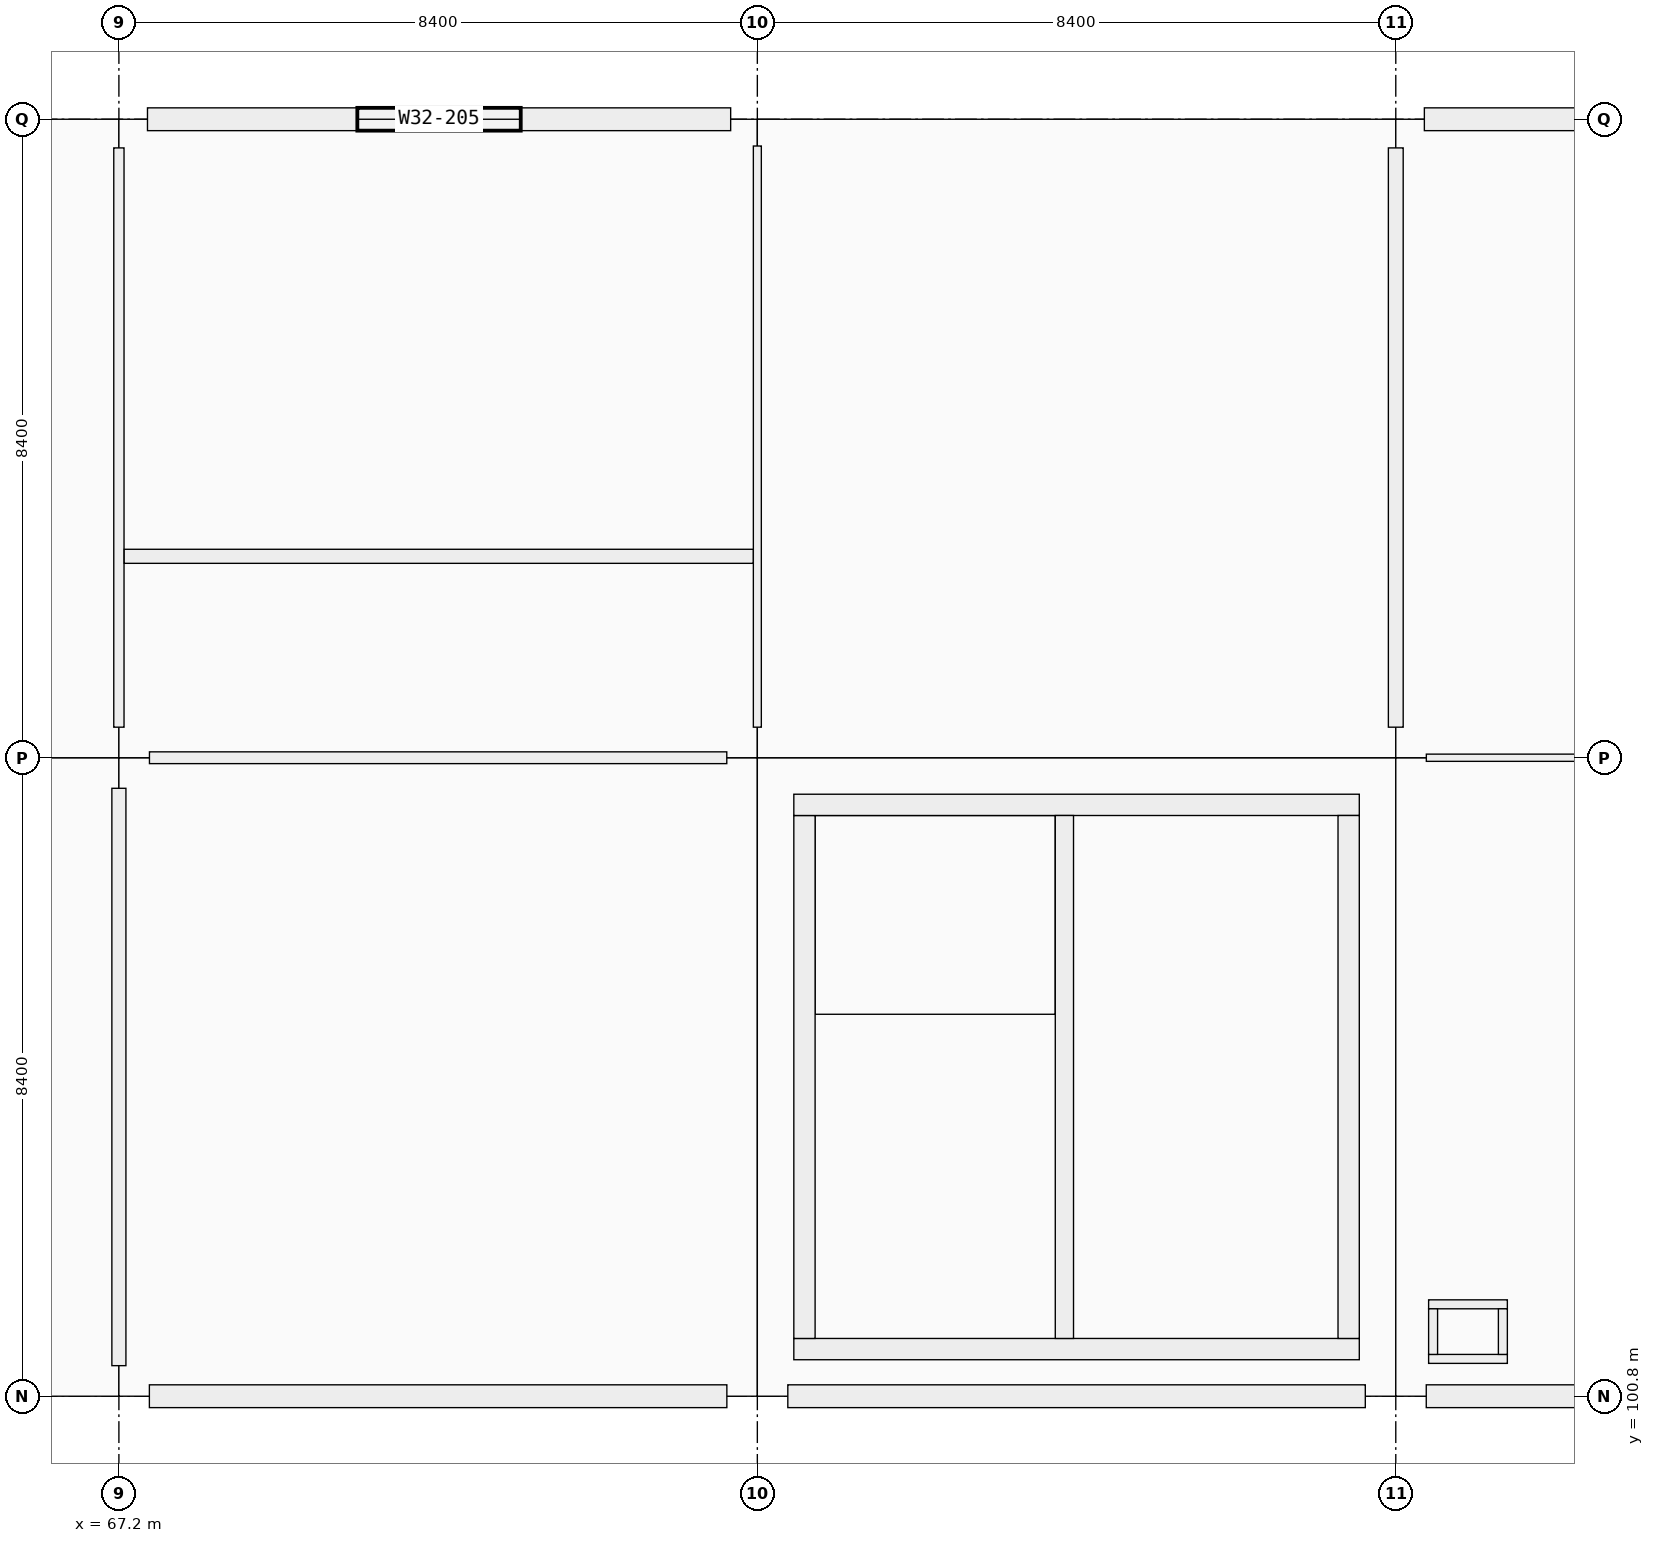
"""IFC4 building model, lengths in metres.
Left out: names, types, materials, properties, quantities, classifications, styles, units other than length and angle.
Written with IfcOpenShell. Run it as: python <this file> out.ifc"""

import sys

from ifc_helpers import new_model, si_unit, direction, frame, frame_2d, origin, origin_2d, place, context, subcontext, project, spatial, rectangle, extrude, element, fill, save


model = new_model("IFC4")
c1 = context("Model", 3, precision=1e-05, world=origin(), true_north=direction((0.0, 1.0)))
c2 = subcontext(c1, "Body", "Model", "MODEL_VIEW")
j1 = project(units=[si_unit("LENGTHUNIT", "METRE"), si_unit("PLANEANGLEUNIT", "RADIAN")], contexts=[c1])
p1 = place(None, origin())
s1 = spatial("IfcSite", under=j1, at=p1, CompositionType="ELEMENT")
p2 = place(p1, origin())
s2 = spatial("IfcBuilding", under=s1, at=p2, CompositionType="ELEMENT")
p3 = place(p2, frame((0.0, 0.0, 14.76)))
s3 = spatial("IfcBuildingStorey", under=s2, at=p3, CompositionType="ELEMENT", Elevation=14.76)
for number, where, z_axis, x_axis in (
    (1, (67.2, 100.8, 0.0), (0.0, 0.0, 1.0), (1.0, 0.0, 0.0)),
    (2, (67.2, 109.2, 0.0), (0.0, 0.0, 1.0), (1.0, 0.0, 0.0)),
):
    element("IfcColumn", number, at=place(p3, frame(where, z_axis=z_axis, x_axis=x_axis)), inside=s3, PredefinedType="COLUMN", context=c2, shape_type="SweptSolid", body=[
        extrude(rectangle(XDim=0.8, YDim=0.8, at=origin_2d()), origin(), (0.0, 0.0, 1.0), 4.32),
    ])
p4 = place(p3, frame((67.2, 117.6, 0.0), z_axis=(0.0, 0.0, 1.0), x_axis=(1.0, 0.0, 0.0)))
e3 = element("IfcColumn", 3, at=p4, inside=s3, PredefinedType="COLUMN", context=c2, shape_type="SweptSolid", body=[
    extrude(rectangle(XDim=0.75, YDim=0.75, at=origin_2d()), origin(), (0.0, 0.0, 1.0), 4.32),
])
for number, where, z_axis, x_axis in (
    (4, (75.6, 100.8, 0.0), (0.0, 0.0, 1.0), (1.0, 0.0, 0.0)),
    (5, (75.6, 109.2, 0.0), (0.0, 0.0, 1.0), (1.0, 0.0, 0.0)),
):
    element("IfcColumn", number, at=place(p3, frame(where, z_axis=z_axis, x_axis=x_axis)), inside=s3, PredefinedType="COLUMN", context=c2, shape_type="SweptSolid", body=[
        extrude(rectangle(XDim=0.8, YDim=0.8, at=origin_2d()), origin(), (0.0, 0.0, 1.0), 4.32),
    ])
p5 = place(p3, frame((75.6, 117.6, 0.0), z_axis=(0.0, 0.0, 1.0), x_axis=(1.0, 0.0, 0.0)))
e6 = element("IfcColumn", 6, at=p5, inside=s3, PredefinedType="COLUMN", context=c2, shape_type="SweptSolid", body=[
    extrude(rectangle(XDim=0.7, YDim=0.7, at=origin_2d()), origin(), (0.0, 0.0, 1.0), 4.32),
])
for number, where, z_axis, x_axis in (
    (7, (84.0, 100.8, 0.0), (0.0, 0.0, 1.0), (1.0, 0.0, 0.0)),
    (8, (84.0, 109.2, 0.0), (0.0, 0.0, 1.0), (1.0, 0.0, 0.0)),
):
    element("IfcColumn", number, at=place(p3, frame(where, z_axis=z_axis, x_axis=x_axis)), inside=s3, PredefinedType="COLUMN", context=c2, shape_type="SweptSolid", body=[
        extrude(rectangle(XDim=0.8, YDim=0.8, at=origin_2d()), origin(), (0.0, 0.0, 1.0), 4.32),
    ])
p6 = place(p3, frame((84.0, 117.6, 0.0), z_axis=(0.0, 0.0, 1.0), x_axis=(1.0, 0.0, 0.0)))
e9 = element("IfcColumn", 9, at=p6, inside=s3, PredefinedType="COLUMN", context=c2, shape_type="SweptSolid", body=[
    extrude(rectangle(XDim=0.75, YDim=0.75, at=origin_2d()), origin(), (0.0, 0.0, 1.0), 4.32),
])
p7 = place(p3, frame((75.199, 100.8, 0.0), z_axis=(0.0, 0.0, 1.0), x_axis=(-1.0, 0.0, 0.0)))
e10 = element("IfcWall", 10, at=p7, inside=s3, PredefinedType="SOLIDWALL", context=c2, shape_type="SweptSolid", body=[
    extrude(rectangle(XDim=7.598, YDim=0.3, at=frame_2d((3.799, 0.0))), origin(), (0.0, 0.0, 1.0), 3.37),
])
p8 = place(p7, frame((2.924, 0.0, 0.9)))
e11 = element("IfcOpeningElement", 11, at=p8, cuts=e10, PredefinedType="OPENING", context=c2, shape_type="SweptSolid", body=[
    extrude(rectangle(XDim=1.75, YDim=1.95, at=frame_2d((0.875, 0.975))), frame((0.0, 0.15, 0.0), z_axis=(0.0, -1.0, 0.0), x_axis=(1.0, 0.0, 0.0)), (0.0, 0.0, 1.0), 0.3),
])
p9 = place(p3, frame((67.576, 117.6, 0.0), z_axis=(0.0, 0.0, 1.0), x_axis=(1.0, 0.0, 0.0)))
e12 = element("IfcWall", 12, at=p9, inside=s3, PredefinedType="SOLIDWALL", context=c2, shape_type="SweptSolid", body=[
    extrude(rectangle(XDim=7.673, YDim=0.3, at=frame_2d((3.836, 0.0))), origin(), (0.0, 0.0, 1.0), 3.37),
])
p10 = place(p9, frame((2.761, 0.0, 0.9)))
e13 = element("IfcOpeningElement", 13, at=p10, cuts=e12, PredefinedType="OPENING", context=c2, shape_type="SweptSolid", body=[
    extrude(rectangle(XDim=2.15, YDim=1.95, at=frame_2d((1.075, 0.975))), frame((0.0, 0.15, 0.0), z_axis=(0.0, -1.0, 0.0), x_axis=(1.0, 0.0, 0.0)), (0.0, 0.0, 1.0), 0.3),
])
p11 = place(p3, frame((83.599, 100.8, 0.0), z_axis=(0.0, 0.0, 1.0), x_axis=(-1.0, 0.0, 0.0)))
e14 = element("IfcWall", 14, at=p11, inside=s3, PredefinedType="SOLIDWALL", context=c2, shape_type="SweptSolid", body=[
    extrude(rectangle(XDim=7.598, YDim=0.3, at=frame_2d((3.799, 0.0))), origin(), (0.0, 0.0, 1.0), 3.37),
])
p12 = place(p3, frame((91.999, 100.8, 0.0), z_axis=(0.0, 0.0, 1.0), x_axis=(-1.0, 0.0, 0.0)))
e15 = element("IfcWall", 15, at=p12, inside=s3, PredefinedType="SOLIDWALL", context=c2, shape_type="SweptSolid", body=[
    extrude(rectangle(XDim=7.598, YDim=0.3, at=frame_2d((3.799, 0.0))), origin(), (0.0, 0.0, 1.0), 3.37),
])
p13 = place(p12, frame((2.824, 0.0, 0.9)))
e16 = element("IfcOpeningElement", 16, at=p13, cuts=e15, PredefinedType="OPENING", context=c2, shape_type="SweptSolid", body=[
    extrude(rectangle(XDim=1.95, YDim=1.6, at=frame_2d((0.975, 0.8))), frame((0.0, 0.15, 0.0), z_axis=(0.0, -1.0, 0.0), x_axis=(1.0, 0.0, 0.0)), (0.0, 0.0, 1.0), 0.3),
])
p14 = place(p3, frame((84.376, 117.6, 0.0), z_axis=(0.0, 0.0, 1.0), x_axis=(1.0, 0.0, 0.0)))
e17 = element("IfcWall", 17, at=p14, inside=s3, PredefinedType="SOLIDWALL", context=c2, shape_type="SweptSolid", body=[
    extrude(rectangle(XDim=7.673, YDim=0.3, at=frame_2d((3.836, 0.0))), origin(), (0.0, 0.0, 1.0), 3.37),
])
p15 = place(p14, frame((2.662, 0.0, 0.9)))
e18 = element("IfcOpeningElement", 18, at=p15, cuts=e17, PredefinedType="OPENING", context=c2, shape_type="SweptSolid", body=[
    extrude(rectangle(XDim=2.35, YDim=1.6, at=frame_2d((1.175, 0.8))), frame((0.0, 0.15, 0.0), z_axis=(0.0, -1.0, 0.0), x_axis=(1.0, 0.0, 0.0)), (0.0, 0.0, 1.0), 0.3),
])
p16 = place(p3, frame((83.52, 101.42, 0.0), z_axis=(0.0, 0.0, 1.0), x_axis=(-1.0, 0.0, 0.0)))
e19 = element("IfcWall", 19, at=p16, inside=s3, PredefinedType="SHEAR", context=c2, shape_type="SweptSolid", body=[
    extrude(rectangle(XDim=7.44, YDim=0.28, at=frame_2d((3.72, 0.0))), origin(), (0.0, 0.0, 1.0), 4.32),
])
p17 = place(p3, frame((76.22, 101.56, 0.0), z_axis=(0.0, 0.0, 1.0), x_axis=(0.0, 1.0, 0.0)))
e20 = element("IfcWall", 20, at=p17, inside=s3, PredefinedType="SHEAR", context=c2, shape_type="SweptSolid", body=[
    extrude(rectangle(XDim=6.88, YDim=0.28, at=frame_2d((3.44, 0.0))), origin(), (0.0, 0.0, 1.0), 4.32),
])
p18 = place(p3, frame((76.08, 108.58, 0.0), z_axis=(0.0, 0.0, 1.0), x_axis=(1.0, 0.0, 0.0)))
e21 = element("IfcWall", 21, at=p18, inside=s3, PredefinedType="SHEAR", context=c2, shape_type="SweptSolid", body=[
    extrude(rectangle(XDim=7.44, YDim=0.28, at=frame_2d((3.72, 0.0))), origin(), (0.0, 0.0, 1.0), 4.32),
])
p19 = place(p3, frame((83.38, 108.44, 0.0), z_axis=(0.0, 0.0, 1.0), x_axis=(0.0, -1.0, 0.0)))
e22 = element("IfcWall", 22, at=p19, inside=s3, PredefinedType="SHEAR", context=c2, shape_type="SweptSolid", body=[
    extrude(rectangle(XDim=6.88, YDim=0.28, at=frame_2d((3.44, 0.0))), origin(), (0.0, 0.0, 1.0), 4.32),
])
p20 = place(p19, frame((3.99, 0.0, 0.0)))
e23 = element("IfcOpeningElement", 23, at=p20, cuts=e22, PredefinedType="OPENING", context=c2, shape_type="SweptSolid", body=[
    extrude(rectangle(XDim=1.5, YDim=2.15, at=frame_2d((0.75, 1.075))), frame((0.0, 0.14, 0.0), z_axis=(0.0, -1.0, 0.0), x_axis=(1.0, 0.0, 0.0)), (0.0, 0.0, 1.0), 0.28),
])
p21 = place(p3, frame((79.64, 101.56, 0.0), z_axis=(0.0, 0.0, 1.0), x_axis=(0.0, 1.0, 0.0)))
e24 = element("IfcWall", 24, at=p21, inside=s3, PredefinedType="SHEAR", context=c2, shape_type="SweptSolid", body=[
    extrude(rectangle(XDim=6.88, YDim=0.24, at=frame_2d((3.44, 0.0))), origin(), (0.0, 0.0, 1.0), 4.32),
])
p22 = place(p21, frame((0.12, 0.0, 0.0)))
e25 = element("IfcOpeningElement", 25, at=p22, cuts=e24, PredefinedType="OPENING", context=c2, shape_type="SweptSolid", body=[
    extrude(rectangle(XDim=1.0, YDim=2.15, at=frame_2d((0.5, 1.075))), frame((0.0, 0.12, 0.0), z_axis=(0.0, -1.0, 0.0), x_axis=(1.0, 0.0, 0.0)), (0.0, 0.0, 1.0), 0.24),
])
for number, where, z_axis, x_axis in (
    (26, (84.432, 101.291, 0.0), (0.0, 0.0, 1.0), (1.0, 0.0, 0.0)),
    (27, (84.432, 102.009, 0.0), (0.0, 0.0, 1.0), (1.0, 0.0, 0.0)),
):
    element("IfcWall", number, at=place(p3, frame(where, z_axis=z_axis, x_axis=x_axis)), inside=s3, PredefinedType="PARTITIONING", context=c2, shape_type="SweptSolid", body=[
        extrude(rectangle(XDim=1.036, YDim=0.118, at=frame_2d((0.518, 0.0))), origin(), (0.0, 0.0, 1.0), 3.35),
    ])
for number, where, z_axis, x_axis in (
    (28, (84.491, 101.35, 0.0), (0.0, 0.0, 1.0), (0.0, 1.0, 0.0)),
    (29, (85.409, 101.35, 0.0), (0.0, 0.0, 1.0), (0.0, 1.0, 0.0)),
):
    element("IfcWall", number, at=place(p3, frame(where, z_axis=z_axis, x_axis=x_axis)), inside=s3, PredefinedType="PARTITIONING", context=c2, shape_type="SweptSolid", body=[
        extrude(rectangle(XDim=0.6, YDim=0.118, at=frame_2d((0.3, 0.0))), origin(), (0.0, 0.0, 1.0), 3.35),
    ])
p23 = place(p3, frame((67.602, 109.2, 0.0), z_axis=(0.0, 0.0, 1.0), x_axis=(1.0, 0.0, 0.0)))
e30 = element("IfcWall", 30, at=p23, inside=s3, PredefinedType="PARTITIONING", context=c2, shape_type="SweptSolid", body=[
    extrude(rectangle(XDim=7.596, YDim=0.155, at=frame_2d((3.798, 0.0))), origin(), (0.0, 0.0, 1.0), 3.19),
])
p24 = place(p3, frame((84.402, 109.2, 0.0), z_axis=(0.0, 0.0, 1.0), x_axis=(1.0, 0.0, 0.0)))
e31 = element("IfcWall", 31, at=p24, inside=s3, PredefinedType="PARTITIONING", context=c2, shape_type="SweptSolid", body=[
    extrude(rectangle(XDim=7.596, YDim=0.095, at=frame_2d((3.798, 0.0))), origin(), (0.0, 0.0, 1.0), 3.19),
])
p25 = place(p24, frame((3.308, 0.0, 0.0)))
e32 = element("IfcOpeningElement", 32, at=p25, cuts=e31, PredefinedType="OPENING", context=c2, shape_type="SweptSolid", body=[
    extrude(rectangle(XDim=0.98, YDim=2.18, at=frame_2d((0.49, 1.09))), frame((0.0, 0.047, 0.0), z_axis=(0.0, -1.0, 0.0), x_axis=(1.0, 0.0, 0.0)), (0.0, 0.0, 1.0), 0.095),
])
p26 = place(p3, frame((67.2, 101.202, 0.0), z_axis=(0.0, 0.0, 1.0), x_axis=(0.0, 1.0, 0.0)))
e33 = element("IfcWall", 33, at=p26, inside=s3, PredefinedType="PARTITIONING", context=c2, shape_type="SweptSolid", body=[
    extrude(rectangle(XDim=7.596, YDim=0.185, at=frame_2d((3.798, 0.0))), origin(), (0.0, 0.0, 1.0), 3.19),
])
p27 = place(p26, frame((3.318, 0.0, 0.0)))
e34 = element("IfcOpeningElement", 34, at=p27, cuts=e33, PredefinedType="OPENING", context=c2, shape_type="SweptSolid", body=[
    extrude(rectangle(XDim=0.96, YDim=2.18, at=frame_2d((0.48, 1.09))), frame((0.0, 0.093, 0.0), z_axis=(0.0, -1.0, 0.0), x_axis=(1.0, 0.0, 0.0)), (0.0, 0.0, 1.0), 0.185),
])
p28 = place(p3, frame((67.2, 109.602, 0.0), z_axis=(0.0, 0.0, 1.0), x_axis=(0.0, 1.0, 0.0)))
e35 = element("IfcWall", 35, at=p28, inside=s3, PredefinedType="PARTITIONING", context=c2, shape_type="SweptSolid", body=[
    extrude(rectangle(XDim=7.621, YDim=0.135, at=frame_2d((3.811, 0.0))), origin(), (0.0, 0.0, 1.0), 3.19),
])
p29 = place(p28, frame((0.573, 0.0, 0.0)))
e36 = element("IfcOpeningElement", 36, at=p29, cuts=e35, PredefinedType="OPENING", context=c2, shape_type="SweptSolid", body=[
    extrude(rectangle(XDim=0.98, YDim=2.08, at=frame_2d((0.49, 1.04))), frame((0.0, 0.067, 0.0), z_axis=(0.0, -1.0, 0.0), x_axis=(1.0, 0.0, 0.0)), (0.0, 0.0, 1.0), 0.135),
])
p30 = place(p28, frame((4.513, 0.0, 0.0)))
e37 = element("IfcOpeningElement", 37, at=p30, cuts=e35, PredefinedType="OPENING", context=c2, shape_type="SweptSolid", body=[
    extrude(rectangle(XDim=0.94, YDim=2.08, at=frame_2d((0.47, 1.04))), frame((0.0, 0.067, 0.0), z_axis=(0.0, -1.0, 0.0), x_axis=(1.0, 0.0, 0.0)), (0.0, 0.0, 1.0), 0.135),
])
p31 = place(p3, frame((75.6, 109.602, 0.0), z_axis=(0.0, 0.0, 1.0), x_axis=(0.0, 1.0, 0.0)))
e38 = element("IfcWall", 38, at=p31, inside=s3, PredefinedType="PARTITIONING", context=c2, shape_type="SweptSolid", body=[
    extrude(rectangle(XDim=7.646, YDim=0.105, at=frame_2d((3.823, 0.0))), origin(), (0.0, 0.0, 1.0), 3.19),
])
p32 = place(p3, frame((84.0, 109.602, 0.0), z_axis=(0.0, 0.0, 1.0), x_axis=(0.0, 1.0, 0.0)))
e39 = element("IfcWall", 39, at=p32, inside=s3, PredefinedType="PARTITIONING", context=c2, shape_type="SweptSolid", body=[
    extrude(rectangle(XDim=7.621, YDim=0.195, at=frame_2d((3.811, 0.0))), origin(), (0.0, 0.0, 1.0), 3.19),
])
p33 = place(p32, frame((3.301, 0.0, 0.0)))
e40 = element("IfcOpeningElement", 40, at=p33, cuts=e39, PredefinedType="OPENING", context=c2, shape_type="SweptSolid", body=[
    extrude(rectangle(XDim=1.02, YDim=2.2, at=frame_2d((0.51, 1.1))), frame((0.0, 0.098, 0.0), z_axis=(0.0, -1.0, 0.0), x_axis=(1.0, 0.0, 0.0)), (0.0, 0.0, 1.0), 0.195),
])
p34 = place(p3, frame((67.27, 111.85, 0.0), z_axis=(0.0, 0.0, 1.0), x_axis=(1.0, 0.0, 0.0)))
e41 = element("IfcWall", 41, at=p34, inside=s3, PredefinedType="PARTITIONING", context=c2, shape_type="SweptSolid", body=[
    extrude(rectangle(XDim=8.276, YDim=0.185, at=frame_2d((4.138, 0.0))), origin(), (0.0, 0.0, 1.0), 3.19),
])
p35 = place(p8, origin())
e42 = element("IfcWindow", 42, at=p35, inside=s3, PartitioningType="SINGLE_PANEL", PredefinedType="WINDOW", context=c2, shape_type="SweptSolid", body=[
    extrude(rectangle(XDim=1.75, YDim=1.95, at=frame_2d((0.875, 0.975))), frame((0.0, 0.03, 0.0), z_axis=(0.0, -1.0, 0.0), x_axis=(1.0, 0.0, 0.0)), (0.0, 0.0, 1.0), 0.06),
])
fill(e11, e42)
p36 = place(p10, origin())
e43 = element("IfcWindow", 43, at=p36, inside=s3, PartitioningType="SINGLE_PANEL", PredefinedType="WINDOW", context=c2, shape_type="SweptSolid", body=[
    extrude(rectangle(XDim=2.15, YDim=1.95, at=frame_2d((1.075, 0.975))), frame((0.0, 0.03, 0.0), z_axis=(0.0, -1.0, 0.0), x_axis=(1.0, 0.0, 0.0)), (0.0, 0.0, 1.0), 0.06),
])
fill(e13, e43)
p37 = place(p22, origin())
e44 = element("IfcDoor", 44, at=p37, inside=s3, OperationType="SINGLE_SWING_RIGHT", PredefinedType="DOOR", context=c2, shape_type="SweptSolid", body=[
    extrude(rectangle(XDim=1.0, YDim=2.15, at=frame_2d((0.5, 1.075))), frame((0.0, 0.025, 0.0), z_axis=(0.0, -1.0, 0.0), x_axis=(1.0, 0.0, 0.0)), (0.0, 0.0, 1.0), 0.05),
])
fill(e25, e44)
p38 = place(p20, origin())
e45 = element("IfcDoor", 45, at=p38, inside=s3, OperationType="DOUBLE_DOOR_SINGLE_SWING", PredefinedType="DOOR", context=c2, shape_type="SweptSolid", body=[
    extrude(rectangle(XDim=1.5, YDim=2.15, at=frame_2d((0.75, 1.075))), frame((0.0, 0.025, 0.0), z_axis=(0.0, -1.0, 0.0), x_axis=(1.0, 0.0, 0.0)), (0.0, 0.0, 1.0), 0.05),
])
fill(e23, e45)
p39 = place(p29, origin())
e46 = element("IfcDoor", 46, at=p39, inside=s3, OperationType="SINGLE_SWING_RIGHT", PredefinedType="DOOR", context=c2, shape_type="SweptSolid", body=[
    extrude(rectangle(XDim=0.98, YDim=2.08, at=frame_2d((0.49, 1.04))), frame((0.0, 0.025, 0.0), z_axis=(0.0, -1.0, 0.0), x_axis=(1.0, 0.0, 0.0)), (0.0, 0.0, 1.0), 0.05),
])
fill(e36, e46)
p40 = place(p30, origin())
e47 = element("IfcDoor", 47, at=p40, inside=s3, OperationType="SINGLE_SWING_LEFT", PredefinedType="DOOR", context=c2, shape_type="SweptSolid", body=[
    extrude(rectangle(XDim=0.94, YDim=2.08, at=frame_2d((0.47, 1.04))), frame((0.0, 0.025, 0.0), z_axis=(0.0, -1.0, 0.0), x_axis=(1.0, 0.0, 0.0)), (0.0, 0.0, 1.0), 0.05),
])
fill(e37, e47)
p41 = place(p27, origin())
e48 = element("IfcDoor", 48, at=p41, inside=s3, OperationType="SINGLE_SWING_LEFT", PredefinedType="DOOR", context=c2, shape_type="SweptSolid", body=[
    extrude(rectangle(XDim=0.96, YDim=2.18, at=frame_2d((0.48, 1.09))), frame((0.0, 0.025, 0.0), z_axis=(0.0, -1.0, 0.0), x_axis=(1.0, 0.0, 0.0)), (0.0, 0.0, 1.0), 0.05),
])
fill(e34, e48)
p42 = place(p33, origin())
e49 = element("IfcDoor", 49, at=p42, inside=s3, OperationType="SINGLE_SWING_LEFT", PredefinedType="DOOR", context=c2, shape_type="SweptSolid", body=[
    extrude(rectangle(XDim=1.02, YDim=2.2, at=frame_2d((0.51, 1.1))), frame((0.0, 0.025, 0.0), z_axis=(0.0, -1.0, 0.0), x_axis=(1.0, 0.0, 0.0)), (0.0, 0.0, 1.0), 0.05),
])
fill(e40, e49)
save(model, sys.argv[1])
